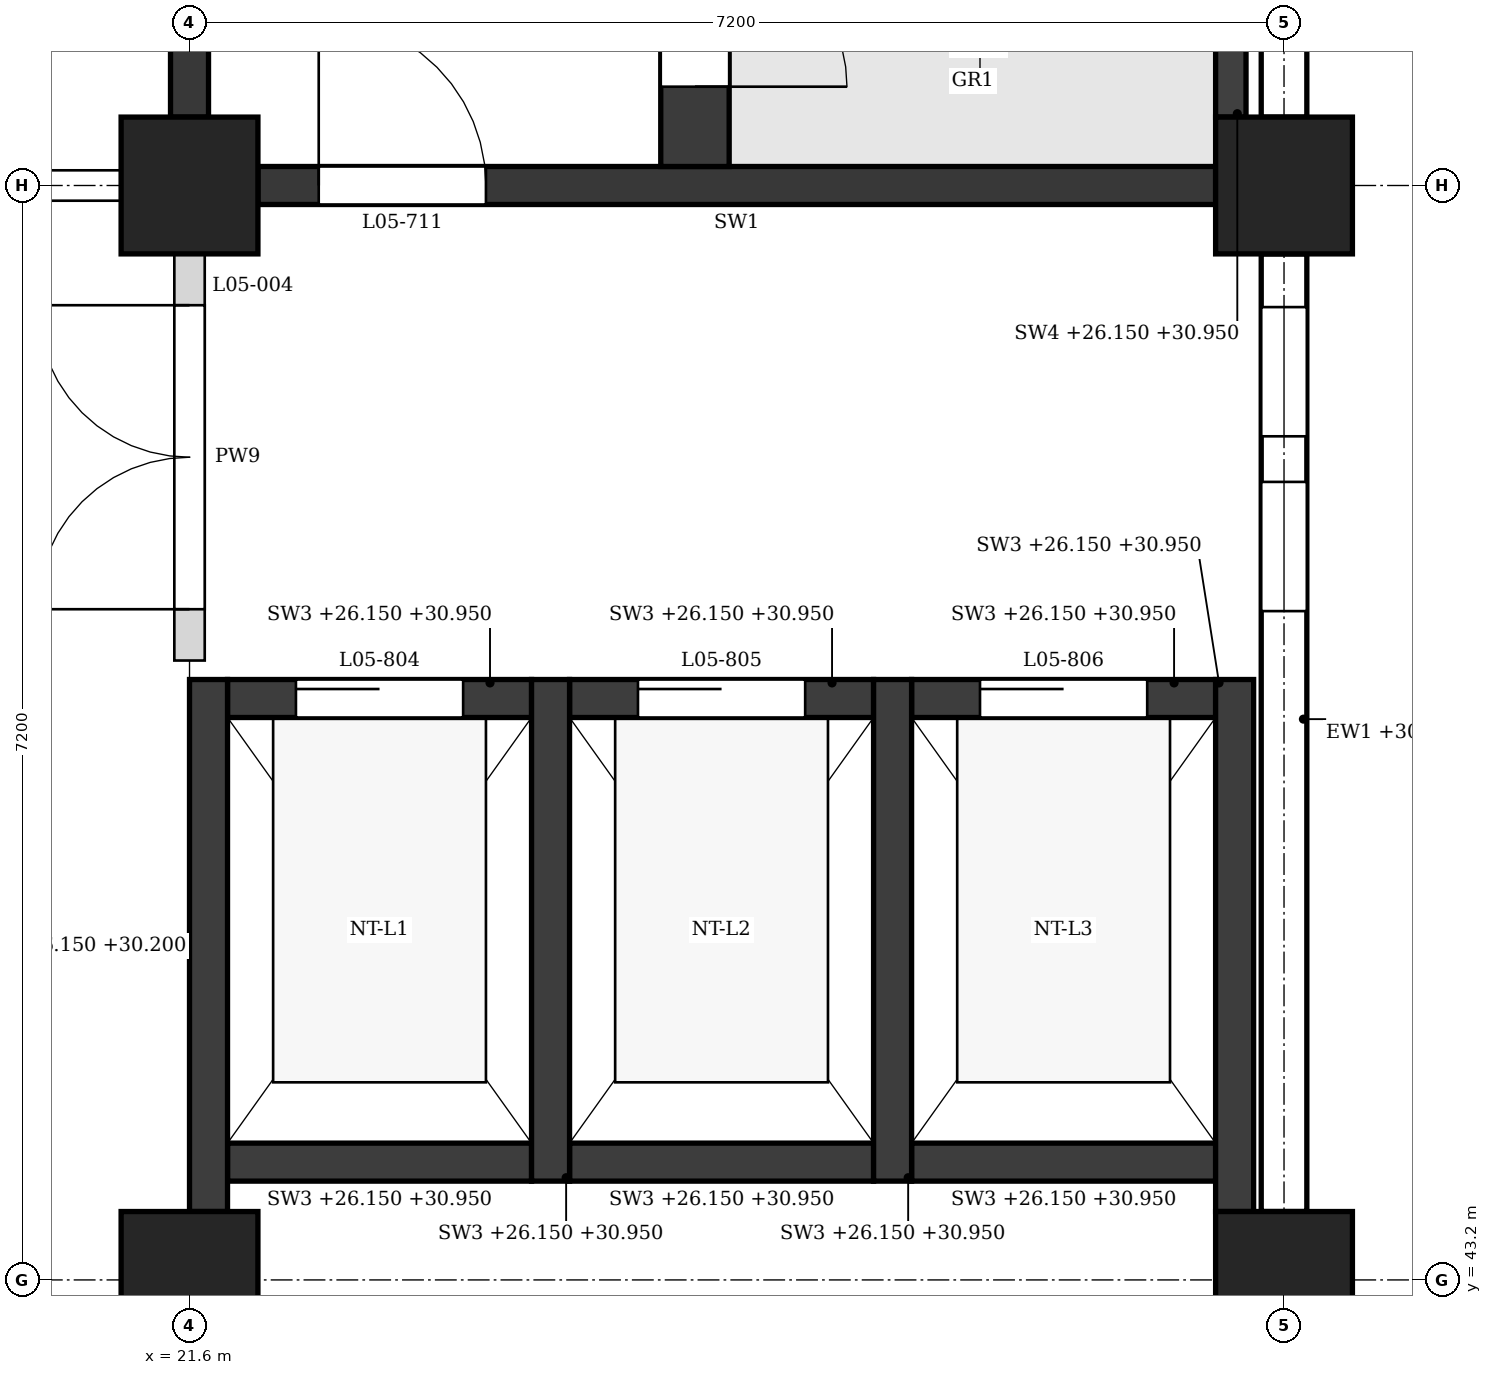
"""IFC4 building model, lengths in metres.
Left out: names, types, materials, properties, quantities, classifications, styles, units other than length and angle.
Written with IfcOpenShell. Run it as: python <this file> out.ifc"""

import sys

from ifc_helpers import new_model, si_unit, direction, frame, frame_2d, origin, origin_2d, place, context, subcontext, project, spatial, polyline, rectangle, outline, extrude, element, fill, save


model = new_model("IFC4")
c1 = context("Model", 3, precision=1e-05, world=origin(), true_north=direction((0.0, 1.0)))
c2 = subcontext(c1, "Body", "Model", "MODEL_VIEW")
j1 = project(units=[si_unit("LENGTHUNIT", "METRE"), si_unit("PLANEANGLEUNIT", "RADIAN")], contexts=[c1])
p1 = place(None, origin())
s1 = spatial("IfcSite", under=j1, at=p1, CompositionType="ELEMENT")
p2 = place(p1, origin())
s2 = spatial("IfcBuilding", under=s1, at=p2, CompositionType="ELEMENT")
p3 = place(p2, frame((0.0, 0.0, 26.4)))
s3 = spatial("IfcBuildingStorey", under=s2, at=p3, CompositionType="ELEMENT", Elevation=26.4)
for number, where, z_axis, x_axis in (
    (1, (21.6, 43.2, 0.0), (0.0, 0.0, 1.0), (1.0, 0.0, 0.0)),
    (2, (21.6, 50.4, 0.0), (0.0, 0.0, 1.0), (1.0, 0.0, 0.0)),
    (3, (28.8, 43.2, 0.0), (0.0, 0.0, 1.0), (1.0, 0.0, 0.0)),
    (4, (28.8, 50.4, 0.0), (0.0, 0.0, 1.0), (1.0, 0.0, 0.0)),
):
    element("IfcColumn", number, at=place(p3, frame(where, z_axis=z_axis, x_axis=x_axis)), inside=s3, PredefinedType="COLUMN", context=c2, shape_type="SweptSolid", body=[
        extrude(rectangle(XDim=0.9, YDim=0.9, at=origin_2d()), origin(), (0.0, 0.0, 1.0), 4.8),
    ])
p4 = place(p3, frame((28.8, 43.65, 0.0), z_axis=(0.0, 0.0, 1.0), x_axis=(0.0, 1.0, 0.0)))
e5 = element("IfcWall", 5, at=p4, inside=s3, PredefinedType="STANDARD", context=c2, shape_type="SweptSolid", body=[
    extrude(rectangle(XDim=6.3, YDim=0.3, at=frame_2d((3.15, 0.0))), origin(), (0.0, 0.0, 1.0), 3.95),
])
p5 = place(p4, frame((3.95, 0.0, 0.9)))
e6 = element("IfcOpeningElement", 6, at=p5, cuts=e5, PredefinedType="OPENING", context=c2, shape_type="SweptSolid", body=[
    extrude(outline(polyline([(0.0, 0.0), (0.85, 0.0), (0.85, 2.05), (0.425, 2.5), (0.0, 2.05), (0.0, 0.0)])), frame((0.0, 0.16, 0.0), z_axis=(0.0, -1.0, 0.0), x_axis=(1.0, 0.0, 0.0)), (0.0, 0.0, 1.0), 0.32),
])
p6 = place(p4, frame((5.1, 0.0, 0.9)))
e7 = element("IfcOpeningElement", 7, at=p6, cuts=e5, PredefinedType="OPENING", context=c2, shape_type="SweptSolid", body=[
    extrude(outline(polyline([(0.0, 0.0), (0.85, 0.0), (0.85, 2.05), (0.425, 2.5), (0.0, 2.05), (0.0, 0.0)])), frame((0.0, 0.16, 0.0), z_axis=(0.0, -1.0, 0.0), x_axis=(1.0, 0.0, 0.0)), (0.0, 0.0, 1.0), 0.32),
])
p7 = place(p3, frame((28.8, 50.85, 0.0), z_axis=(0.0, 0.0, 1.0), x_axis=(0.0, 1.0, 0.0)))
e8 = element("IfcWall", 8, at=p7, inside=s3, PredefinedType="STANDARD", context=c2, shape_type="SweptSolid", body=[
    extrude(rectangle(XDim=6.3, YDim=0.3, at=frame_2d((3.15, 0.0))), origin(), (0.0, 0.0, 1.0), 3.95),
])
p8 = place(p7, frame((0.9, 0.0, 0.9)))
e9 = element("IfcOpeningElement", 9, at=p8, cuts=e8, PredefinedType="OPENING", context=c2, shape_type="SweptSolid", body=[
    extrude(outline(polyline([(0.0, 0.0), (0.9, 0.0), (0.9, 2.05), (0.45, 2.5), (0.0, 2.05), (0.0, 0.0)])), frame((0.0, 0.16, 0.0), z_axis=(0.0, -1.0, 0.0), x_axis=(1.0, 0.0, 0.0)), (0.0, 0.0, 1.0), 0.32),
])
p9 = place(p7, frame((4.5, 0.0, 0.9)))
e10 = element("IfcOpeningElement", 10, at=p9, cuts=e8, PredefinedType="OPENING", context=c2, shape_type="SweptSolid", body=[
    extrude(outline(polyline([(0.0, 0.0), (0.9, 0.0), (0.9, 2.05), (0.45, 2.5), (0.0, 2.05), (0.0, 0.0)])), frame((0.0, 0.16, 0.0), z_axis=(0.0, -1.0, 0.0), x_axis=(1.0, 0.0, 0.0)), (0.0, 0.0, 1.0), 0.32),
])
p10 = place(p3, frame((22.05, 50.4, 0.0), z_axis=(0.0, 0.0, 1.0), x_axis=(1.0, 0.0, 0.0)))
e11 = element("IfcWall", 11, at=p10, inside=s3, PredefinedType="SHEAR", context=c2, shape_type="SweptSolid", body=[
    extrude(rectangle(XDim=6.3, YDim=0.25, at=frame_2d((3.15, 0.0))), origin(), (0.0, 0.0, 1.0), 3.8),
])
p11 = place(p10, frame((0.4, 0.0, 0.0)))
e12 = element("IfcOpeningElement", 12, at=p11, cuts=e11, PredefinedType="OPENING", context=c2, shape_type="SweptSolid", body=[
    extrude(rectangle(XDim=1.1, YDim=2.1, at=frame_2d((0.55, 1.05))), frame((0.0, 0.135, 0.0), z_axis=(0.0, -1.0, 0.0), x_axis=(1.0, 0.0, 0.0)), (0.0, 0.0, 1.0), 0.27),
])
p12 = place(p3, frame((21.6, 50.85, 0.0), z_axis=(0.0, 0.0, 1.0), x_axis=(0.0, 1.0, 0.0)))
e13 = element("IfcWall", 13, at=p12, inside=s3, PredefinedType="SHEAR", context=c2, shape_type="SweptSolid", body=[
    extrude(rectangle(XDim=6.3, YDim=0.25, at=frame_2d((3.15, 0.0))), origin(), (0.0, 0.0, 1.0), 3.8),
])
p13 = place(p3, frame((28.45, 50.85, -0.25), z_axis=(0.0, 0.0, 1.0), x_axis=(0.0, 1.0, 0.0)))
e14 = element("IfcWall", 14, at=p13, inside=s3, PredefinedType="SHEAR", context=c2, shape_type="SweptSolid", body=[
    extrude(rectangle(XDim=0.9, YDim=0.2, at=frame_2d((0.45, 0.0))), origin(), (0.0, 0.0, 1.0), 4.8),
])
p14 = place(p3, frame((24.925, 50.525, 0.0), z_axis=(0.0, 0.0, 1.0), x_axis=(0.0, 1.0, 0.0)))
e15 = element("IfcWall", 15, at=p14, inside=s3, PredefinedType="SHEAR", context=c2, shape_type="SweptSolid", body=[
    extrude(rectangle(XDim=6.85, YDim=0.45, at=frame_2d((3.425, 0.0))), origin(), (0.0, 0.0, 1.0), 4.55),
])
p15 = place(p14, frame((0.525, 0.0, 0.0)))
e16 = element("IfcOpeningElement", 16, at=p15, cuts=e15, PredefinedType="OPENING", context=c2, shape_type="SweptSolid", body=[
    extrude(rectangle(XDim=1.0, YDim=2.1, at=frame_2d((0.5, 1.05))), frame((0.0, 0.235, 0.0), z_axis=(0.0, -1.0, 0.0), x_axis=(1.0, 0.0, 0.0)), (0.0, 0.0, 1.0), 0.47),
])
p16 = place(p3, frame((21.725, 43.65, -0.25), z_axis=(0.0, 0.0, 1.0), x_axis=(0.0, 1.0, 0.0)))
e17 = element("IfcWall", 17, at=p16, inside=s3, PredefinedType="SHEAR", context=c2, shape_type="SweptSolid", body=[
    extrude(rectangle(XDim=3.5, YDim=0.25, at=frame_2d((1.75, 0.0))), origin(), (0.0, 0.0, 1.0), 4.05),
])
for number, where, z_axis, x_axis in (
    (18, (23.975, 43.85, -0.25), (0.0, 0.0, 1.0), (0.0, 1.0, 0.0)),
    (19, (26.225, 43.85, -0.25), (0.0, 0.0, 1.0), (0.0, 1.0, 0.0)),
):
    element("IfcWall", number, at=place(p3, frame(where, z_axis=z_axis, x_axis=x_axis)), inside=s3, PredefinedType="SHEAR", context=c2, shape_type="SweptSolid", body=[
        extrude(rectangle(XDim=3.3, YDim=0.25, at=frame_2d((1.65, 0.0))), origin(), (0.0, 0.0, 1.0), 4.8),
    ])
p17 = place(p3, frame((28.475, 43.65, -0.25), z_axis=(0.0, 0.0, 1.0), x_axis=(0.0, 1.0, 0.0)))
e20 = element("IfcWall", 20, at=p17, inside=s3, PredefinedType="SHEAR", context=c2, shape_type="SweptSolid", body=[
    extrude(rectangle(XDim=3.5, YDim=0.25, at=frame_2d((1.75, 0.0))), origin(), (0.0, 0.0, 1.0), 4.8),
])
p18 = place(p3, frame((21.85, 47.025, -0.25), z_axis=(0.0, 0.0, 1.0), x_axis=(1.0, 0.0, 0.0)))
e21 = element("IfcWall", 21, at=p18, inside=s3, PredefinedType="SHEAR", context=c2, shape_type="SweptSolid", body=[
    extrude(rectangle(XDim=2.0, YDim=0.25, at=frame_2d((1.0, 0.0))), origin(), (0.0, 0.0, 1.0), 4.8),
])
p19 = place(p18, frame((0.45, 0.0, 0.25)))
e22 = element("IfcOpeningElement", 22, at=p19, cuts=e21, PredefinedType="OPENING", context=c2, shape_type="SweptSolid", body=[
    extrude(rectangle(XDim=1.1, YDim=2.1, at=frame_2d((0.55, 1.05))), frame((0.0, 0.135, 0.0), z_axis=(0.0, -1.0, 0.0), x_axis=(1.0, 0.0, 0.0)), (0.0, 0.0, 1.0), 0.27),
])
p20 = place(p3, frame((21.85, 43.975, -0.25), z_axis=(0.0, 0.0, 1.0), x_axis=(1.0, 0.0, 0.0)))
e23 = element("IfcWall", 23, at=p20, inside=s3, PredefinedType="SHEAR", context=c2, shape_type="SweptSolid", body=[
    extrude(rectangle(XDim=2.0, YDim=0.25, at=frame_2d((1.0, 0.0))), origin(), (0.0, 0.0, 1.0), 4.8),
])
p21 = place(p3, frame((24.1, 47.025, -0.25), z_axis=(0.0, 0.0, 1.0), x_axis=(1.0, 0.0, 0.0)))
e24 = element("IfcWall", 24, at=p21, inside=s3, PredefinedType="SHEAR", context=c2, shape_type="SweptSolid", body=[
    extrude(rectangle(XDim=2.0, YDim=0.25, at=frame_2d((1.0, 0.0))), origin(), (0.0, 0.0, 1.0), 4.8),
])
p22 = place(p21, frame((0.45, 0.0, 0.25)))
e25 = element("IfcOpeningElement", 25, at=p22, cuts=e24, PredefinedType="OPENING", context=c2, shape_type="SweptSolid", body=[
    extrude(rectangle(XDim=1.1, YDim=2.1, at=frame_2d((0.55, 1.05))), frame((0.0, 0.135, 0.0), z_axis=(0.0, -1.0, 0.0), x_axis=(1.0, 0.0, 0.0)), (0.0, 0.0, 1.0), 0.27),
])
p23 = place(p3, frame((24.1, 43.975, -0.25), z_axis=(0.0, 0.0, 1.0), x_axis=(1.0, 0.0, 0.0)))
e26 = element("IfcWall", 26, at=p23, inside=s3, PredefinedType="SHEAR", context=c2, shape_type="SweptSolid", body=[
    extrude(rectangle(XDim=2.0, YDim=0.25, at=frame_2d((1.0, 0.0))), origin(), (0.0, 0.0, 1.0), 4.8),
])
p24 = place(p3, frame((26.35, 47.025, -0.25), z_axis=(0.0, 0.0, 1.0), x_axis=(1.0, 0.0, 0.0)))
e27 = element("IfcWall", 27, at=p24, inside=s3, PredefinedType="SHEAR", context=c2, shape_type="SweptSolid", body=[
    extrude(rectangle(XDim=2.0, YDim=0.25, at=frame_2d((1.0, 0.0))), origin(), (0.0, 0.0, 1.0), 4.8),
])
p25 = place(p24, frame((0.45, 0.0, 0.25)))
e28 = element("IfcOpeningElement", 28, at=p25, cuts=e27, PredefinedType="OPENING", context=c2, shape_type="SweptSolid", body=[
    extrude(rectangle(XDim=1.1, YDim=2.1, at=frame_2d((0.55, 1.05))), frame((0.0, 0.135, 0.0), z_axis=(0.0, -1.0, 0.0), x_axis=(1.0, 0.0, 0.0)), (0.0, 0.0, 1.0), 0.27),
])
p26 = place(p3, frame((26.35, 43.975, -0.25), z_axis=(0.0, 0.0, 1.0), x_axis=(1.0, 0.0, 0.0)))
e29 = element("IfcWall", 29, at=p26, inside=s3, PredefinedType="SHEAR", context=c2, shape_type="SweptSolid", body=[
    extrude(rectangle(XDim=2.0, YDim=0.25, at=frame_2d((1.0, 0.0))), origin(), (0.0, 0.0, 1.0), 4.8),
])
p27 = place(p3, frame((14.85, 50.4, 0.0), z_axis=(0.0, 0.0, 1.0), x_axis=(1.0, 0.0, 0.0)))
e30 = element("IfcWall", 30, at=p27, inside=s3, PredefinedType="PARTITIONING", context=c2, shape_type="SweptSolid", body=[
    extrude(rectangle(XDim=6.3, YDim=0.2, at=frame_2d((3.15, 0.0))), origin(), (0.0, 0.0, 1.0), 3.8),
])
p28 = place(p27, frame((4.225, 0.0, 0.0)))
e31 = element("IfcOpeningElement", 31, at=p28, cuts=e30, PredefinedType="OPENING", context=c2, shape_type="SweptSolid", body=[
    extrude(rectangle(XDim=1.0, YDim=2.1, at=frame_2d((0.5, 1.05))), frame((0.0, 0.11, 0.0), z_axis=(0.0, -1.0, 0.0), x_axis=(1.0, 0.0, 0.0)), (0.0, 0.0, 1.0), 0.22),
])
p29 = place(p3, frame((21.6, 47.275, 0.0), z_axis=(0.0, 0.0, 1.0), x_axis=(0.0, 1.0, 0.0)))
e32 = element("IfcWall", 32, at=p29, inside=s3, PredefinedType="PARTITIONING", context=c2, shape_type="SweptSolid", body=[
    extrude(rectangle(XDim=2.675, YDim=0.2, at=frame_2d((1.337, 0.0))), origin(), (0.0, 0.0, 1.0), 3.8),
])
p30 = place(p29, frame((0.337, 0.0, 0.0)))
e33 = element("IfcOpeningElement", 33, at=p30, cuts=e32, PredefinedType="OPENING", context=c2, shape_type="SweptSolid", body=[
    extrude(rectangle(XDim=2.0, YDim=2.4, at=frame_2d((1.0, 1.2))), frame((0.0, 0.11, 0.0), z_axis=(0.0, -1.0, 0.0), x_axis=(1.0, 0.0, 0.0)), (0.0, 0.0, 1.0), 0.22),
])
p31 = place(p5, origin())
e34 = element("IfcWindow", 34, at=p31, inside=s3, PartitioningType="SINGLE_PANEL", PredefinedType="WINDOW", context=c2, shape_type="SweptSolid", body=[
    extrude(outline(polyline([(0.0, 0.0), (0.85, 0.0), (0.85, 2.05), (0.425, 2.5), (0.0, 2.05), (0.0, 0.0)])), frame((0.0, 0.03, 0.0), z_axis=(0.0, -1.0, 0.0), x_axis=(1.0, 0.0, 0.0)), (0.0, 0.0, 1.0), 0.06),
])
fill(e6, e34)
p32 = place(p6, origin())
e35 = element("IfcWindow", 35, at=p32, inside=s3, PartitioningType="SINGLE_PANEL", PredefinedType="WINDOW", context=c2, shape_type="SweptSolid", body=[
    extrude(outline(polyline([(0.0, 0.0), (0.85, 0.0), (0.85, 2.05), (0.425, 2.5), (0.0, 2.05), (0.0, 0.0)])), frame((0.0, 0.03, 0.0), z_axis=(0.0, -1.0, 0.0), x_axis=(1.0, 0.0, 0.0)), (0.0, 0.0, 1.0), 0.06),
])
fill(e7, e35)
p33 = place(p15, frame((1.0, 0.0, 0.0), z_axis=(0.0, 0.0, 1.0), x_axis=(-1.0, 0.0, 0.0)))
e36 = element("IfcDoor", 36, at=p33, inside=s3, OperationType="SINGLE_SWING_RIGHT", PredefinedType="DOOR", context=c2, shape_type="SweptSolid", body=[
    extrude(rectangle(XDim=1.0, YDim=2.1, at=frame_2d((0.5, 1.05))), frame((0.0, 0.025, 0.0), z_axis=(0.0, -1.0, 0.0), x_axis=(1.0, 0.0, 0.0)), (0.0, 0.0, 1.0), 0.05),
])
fill(e16, e36)
p34 = place(p11, origin())
e37 = element("IfcDoor", 37, at=p34, inside=s3, OperationType="SINGLE_SWING_LEFT", PredefinedType="DOOR", context=c2, shape_type="SweptSolid", body=[
    extrude(rectangle(XDim=1.1, YDim=2.1, at=frame_2d((0.55, 1.05))), frame((0.0, 0.025, 0.0), z_axis=(0.0, -1.0, 0.0), x_axis=(1.0, 0.0, 0.0)), (0.0, 0.0, 1.0), 0.05),
])
fill(e12, e37)
p35 = place(p19, origin())
e38 = element("IfcDoor", 38, at=p35, inside=s3, OperationType="SLIDING_TO_LEFT", PredefinedType="DOOR", context=c2, shape_type="SweptSolid", body=[
    extrude(rectangle(XDim=1.1, YDim=2.1, at=frame_2d((0.55, 1.05))), frame((0.0, 0.025, 0.0), z_axis=(0.0, -1.0, 0.0), x_axis=(1.0, 0.0, 0.0)), (0.0, 0.0, 1.0), 0.05),
])
fill(e22, e38)
p36 = place(p22, origin())
e39 = element("IfcDoor", 39, at=p36, inside=s3, OperationType="SLIDING_TO_LEFT", PredefinedType="DOOR", context=c2, shape_type="SweptSolid", body=[
    extrude(rectangle(XDim=1.1, YDim=2.1, at=frame_2d((0.55, 1.05))), frame((0.0, 0.025, 0.0), z_axis=(0.0, -1.0, 0.0), x_axis=(1.0, 0.0, 0.0)), (0.0, 0.0, 1.0), 0.05),
])
fill(e25, e39)
p37 = place(p25, origin())
e40 = element("IfcDoor", 40, at=p37, inside=s3, OperationType="SLIDING_TO_LEFT", PredefinedType="DOOR", context=c2, shape_type="SweptSolid", body=[
    extrude(rectangle(XDim=1.1, YDim=2.1, at=frame_2d((0.55, 1.05))), frame((0.0, 0.025, 0.0), z_axis=(0.0, -1.0, 0.0), x_axis=(1.0, 0.0, 0.0)), (0.0, 0.0, 1.0), 0.05),
])
fill(e28, e40)
p38 = place(p30, origin())
e41 = element("IfcDoor", 41, at=p38, inside=s3, OperationType="DOUBLE_DOOR_SINGLE_SWING", PredefinedType="DOOR", context=c2, shape_type="SweptSolid", body=[
    extrude(rectangle(XDim=2.0, YDim=2.4, at=frame_2d((1.0, 1.2))), frame((0.0, 0.025, 0.0), z_axis=(0.0, -1.0, 0.0), x_axis=(1.0, 0.0, 0.0)), (0.0, 0.0, 1.0), 0.05),
])
fill(e33, e41)
save(model, sys.argv[1])
